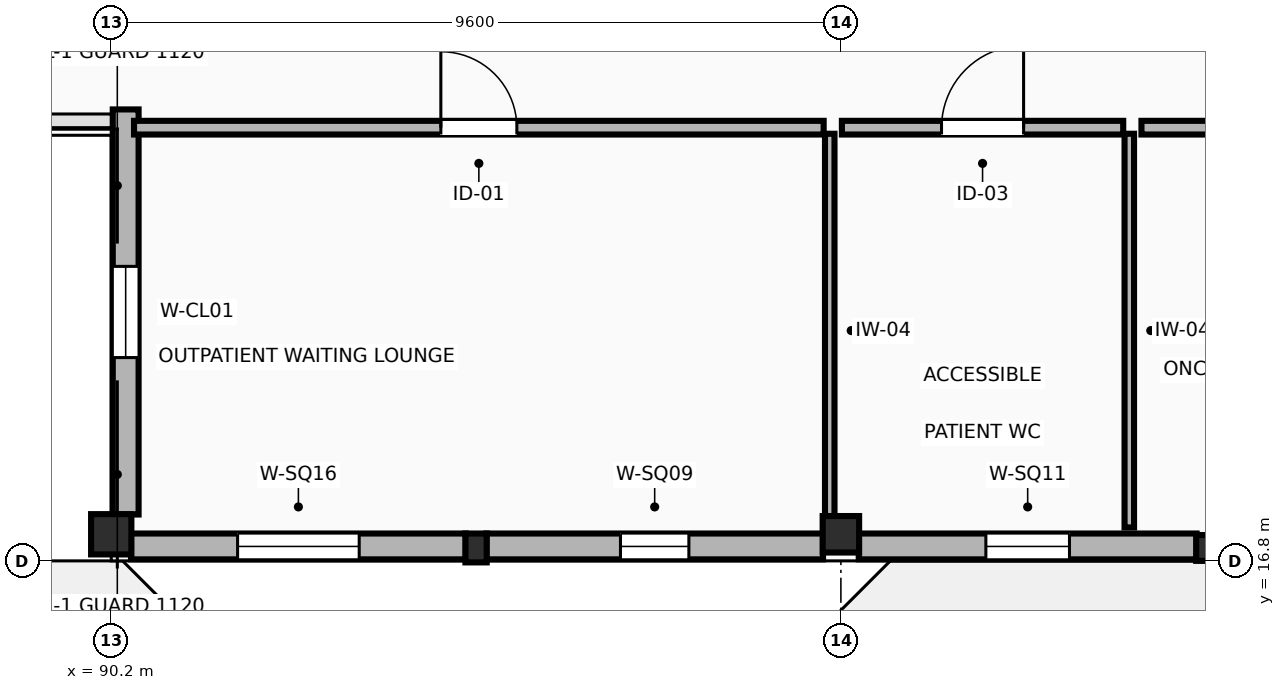
"""IFC4 building model, lengths in metres.
Left out: names, types, materials, properties, quantities, classifications, styles, units other than length and angle.
Written with IfcOpenShell. Run it as: python <this file> out.ifc"""

import sys

from ifc_helpers import new_model, si_unit, direction, frame, frame_2d, origin, origin_2d, place, context, subcontext, project, spatial, rectangle, extrude, element, fill, save


model = new_model("IFC4")
c1 = context("Model", 3, precision=1e-05, world=origin(), true_north=direction((0.0, 1.0)))
c2 = subcontext(c1, "Body", "Model", "MODEL_VIEW")
j1 = project(units=[si_unit("LENGTHUNIT", "METRE"), si_unit("PLANEANGLEUNIT", "RADIAN")], contexts=[c1])
p1 = place(None, origin())
s1 = spatial("IfcSite", under=j1, at=p1, CompositionType="ELEMENT")
p2 = place(p1, origin())
s2 = spatial("IfcBuilding", under=s1, at=p2, CompositionType="ELEMENT")
p3 = place(p2, frame((0.0, 0.0, 5.4)))
s3 = spatial("IfcBuildingStorey", under=s2, at=p3, CompositionType="ELEMENT", Elevation=5.4)
p4 = place(p3, frame((90.2, 17.15, 0.0), z_axis=(0.0, 0.0, 1.0), x_axis=(1.0, 0.0, 0.0)))
e1 = element("IfcColumn", 1, at=p4, inside=s3, PredefinedType="COLUMN", context=c2, shape_type="SweptSolid", body=[
    extrude(rectangle(XDim=0.53, YDim=0.53, at=origin_2d()), origin(), (0.0, 0.0, 1.0), 4.2),
])
p5 = place(p3, frame((99.8, 17.15, 0.0), z_axis=(0.0, 0.0, 1.0), x_axis=(1.0, 0.0, 0.0)))
e2 = element("IfcColumn", 2, at=p5, inside=s3, PredefinedType="COLUMN", context=c2, shape_type="SweptSolid", body=[
    extrude(rectangle(XDim=0.48, YDim=0.48, at=origin_2d()), origin(), (0.0, 0.0, 1.0), 4.2),
])
p6 = place(p3, frame((95.0, 16.97, 0.0), z_axis=(0.0, 0.0, 1.0), x_axis=(1.0, 0.0, 0.0)))
e3 = element("IfcColumn", 3, at=p6, inside=s3, PredefinedType="PILASTER", context=c2, shape_type="SweptSolid", body=[
    extrude(rectangle(XDim=0.28, YDim=0.38, at=origin_2d()), origin(), (0.0, 0.0, 1.0), 4.2),
])
p7 = place(p3, frame((104.6, 16.97, 0.0), z_axis=(0.0, 0.0, 1.0), x_axis=(1.0, 0.0, 0.0)))
e4 = element("IfcColumn", 4, at=p7, inside=s3, PredefinedType="PILASTER", context=c2, shape_type="SweptSolid", body=[
    extrude(rectangle(XDim=0.25, YDim=0.34, at=origin_2d()), origin(), (0.0, 0.0, 1.0), 4.2),
])
p8 = place(p3, frame((90.39, 22.74, 0.0), z_axis=(0.0, 0.0, 1.0), x_axis=(0.0, -1.0, 0.0)))
e5 = element("IfcWall", 5, at=p8, inside=s3, PredefinedType="STANDARD", context=c2, shape_type="SweptSolid", body=[
    extrude(rectangle(XDim=5.33, YDim=0.34, at=frame_2d((2.665, 0.0))), origin(), (0.0, 0.0, 1.0), 3.335),
])
p9 = place(p8, frame((2.065, 0.0, 0.95)))
e6 = element("IfcOpeningElement", 6, at=p9, cuts=e5, PredefinedType="OPENING", context=c2, shape_type="SweptSolid", body=[
    extrude(rectangle(XDim=1.2, YDim=1.5, at=frame_2d((0.6, 0.75))), frame((0.0, 0.18, 0.0), z_axis=(0.0, -1.0, 0.0), x_axis=(1.0, 0.0, 0.0)), (0.0, 0.0, 1.0), 0.36),
])
p10 = place(p3, frame((90.46, 16.99, 0.0), z_axis=(0.0, 0.0, 1.0), x_axis=(1.0, 0.0, 0.0)))
e7 = element("IfcWall", 7, at=p10, inside=s3, PredefinedType="STANDARD", context=c2, shape_type="SweptSolid", body=[
    extrude(rectangle(XDim=4.405, YDim=0.34, at=frame_2d((2.203, 0.0))), origin(), (0.0, 0.0, 1.0), 3.185),
])
p11 = place(p10, frame((1.403, 0.0, 0.95)))
e8 = element("IfcOpeningElement", 8, at=p11, cuts=e7, PredefinedType="OPENING", context=c2, shape_type="SweptSolid", body=[
    extrude(rectangle(XDim=1.6, YDim=1.6, at=frame_2d((0.8, 0.8))), frame((0.0, 0.18, 0.0), z_axis=(0.0, -1.0, 0.0), x_axis=(1.0, 0.0, 0.0)), (0.0, 0.0, 1.0), 0.36),
])
p12 = place(p3, frame((95.135, 16.99, 0.0), z_axis=(0.0, 0.0, 1.0), x_axis=(1.0, 0.0, 0.0)))
e9 = element("IfcWall", 9, at=p12, inside=s3, PredefinedType="STANDARD", context=c2, shape_type="SweptSolid", body=[
    extrude(rectangle(XDim=4.43, YDim=0.34, at=frame_2d((2.215, 0.0))), origin(), (0.0, 0.0, 1.0), 3.185),
])
p13 = place(p12, frame((1.765, 0.0, 0.95)))
e10 = element("IfcOpeningElement", 10, at=p13, cuts=e9, PredefinedType="OPENING", context=c2, shape_type="SweptSolid", body=[
    extrude(rectangle(XDim=0.9, YDim=0.9, at=frame_2d((0.45, 0.45))), frame((0.0, 0.18, 0.0), z_axis=(0.0, -1.0, 0.0), x_axis=(1.0, 0.0, 0.0)), (0.0, 0.0, 1.0), 0.36),
])
p14 = place(p3, frame((100.035, 16.99, 0.0), z_axis=(0.0, 0.0, 1.0), x_axis=(1.0, 0.0, 0.0)))
e11 = element("IfcWall", 11, at=p14, inside=s3, PredefinedType="STANDARD", context=c2, shape_type="SweptSolid", body=[
    extrude(rectangle(XDim=4.445, YDim=0.34, at=frame_2d((2.223, 0.0))), origin(), (0.0, 0.0, 1.0), 3.185),
])
p15 = place(p14, frame((1.673, 0.0, 1.15)))
e12 = element("IfcOpeningElement", 12, at=p15, cuts=e11, PredefinedType="OPENING", context=c2, shape_type="SweptSolid", body=[
    extrude(rectangle(XDim=1.1, YDim=1.1, at=frame_2d((0.55, 0.55))), frame((0.0, 0.18, 0.0), z_axis=(0.0, -1.0, 0.0), x_axis=(1.0, 0.0, 0.0)), (0.0, 0.0, 1.0), 0.36),
])
p16 = place(p3, frame((90.5, 22.5, 0.0), z_axis=(0.0, 0.0, 1.0), x_axis=(1.0, 0.0, 0.0)))
e13 = element("IfcWall", 13, at=p16, inside=s3, PredefinedType="PARTITIONING", context=c2, shape_type="SweptSolid", body=[
    extrude(rectangle(XDim=9.073, YDim=0.18, at=frame_2d((4.537, 0.0))), origin(), (0.0, 0.0, 1.0), 3.92),
])
p17 = place(p16, frame((4.037, 0.0, 0.0)))
e14 = element("IfcOpeningElement", 14, at=p17, cuts=e13, PredefinedType="OPENING", context=c2, shape_type="SweptSolid", body=[
    extrude(rectangle(XDim=1.0, YDim=2.15, at=frame_2d((0.5, 1.075))), frame((0.0, 0.1, 0.0), z_axis=(0.0, -1.0, 0.0), x_axis=(1.0, 0.0, 0.0)), (0.0, 0.0, 1.0), 0.2),
])
p18 = place(p3, frame((99.653, 22.42, 0.0), z_axis=(0.0, 0.0, 1.0), x_axis=(0.0, -1.0, 0.0)))
e15 = element("IfcWall", 15, at=p18, inside=s3, PredefinedType="PARTITIONING", context=c2, shape_type="SweptSolid", body=[
    extrude(rectangle(XDim=5.18, YDim=0.125, at=frame_2d((2.59, 0.0))), origin(), (0.0, 0.0, 1.0), 3.405),
])
p19 = place(p3, frame((103.594, 22.42, 0.0), z_axis=(0.0, 0.0, 1.0), x_axis=(0.0, -1.0, 0.0)))
e16 = element("IfcWall", 16, at=p19, inside=s3, PredefinedType="PARTITIONING", context=c2, shape_type="SweptSolid", body=[
    extrude(rectangle(XDim=5.18, YDim=0.125, at=frame_2d((2.59, 0.0))), origin(), (0.0, 0.0, 1.0), 3.92),
])
p20 = place(p3, frame((99.813, 22.5, 0.0), z_axis=(0.0, 0.0, 1.0), x_axis=(1.0, 0.0, 0.0)))
e17 = element("IfcWall", 17, at=p20, inside=s3, PredefinedType="PARTITIONING", context=c2, shape_type="SweptSolid", body=[
    extrude(rectangle(XDim=3.701, YDim=0.18, at=frame_2d((1.851, 0.0))), origin(), (0.0, 0.0, 1.0), 3.92),
])
p21 = place(p20, frame((1.311, 0.0, 0.0)))
e18 = element("IfcOpeningElement", 18, at=p21, cuts=e17, PredefinedType="OPENING", context=c2, shape_type="SweptSolid", body=[
    extrude(rectangle(XDim=1.08, YDim=2.2, at=frame_2d((0.54, 1.1))), frame((0.0, 0.1, 0.0), z_axis=(0.0, -1.0, 0.0), x_axis=(1.0, 0.0, 0.0)), (0.0, 0.0, 1.0), 0.2),
])
p22 = place(p3, frame((103.754, 22.5, 0.0), z_axis=(0.0, 0.0, 1.0), x_axis=(1.0, 0.0, 0.0)))
e19 = element("IfcWall", 19, at=p22, inside=s3, PredefinedType="PARTITIONING", context=c2, shape_type="SweptSolid", body=[
    extrude(rectangle(XDim=5.092, YDim=0.18, at=frame_2d((2.546, 0.0))), origin(), (0.0, 0.0, 1.0), 3.92),
])
p23 = place(p22, frame((2.066, 0.0, 0.0)))
e20 = element("IfcOpeningElement", 20, at=p23, cuts=e19, PredefinedType="OPENING", context=c2, shape_type="SweptSolid", body=[
    extrude(rectangle(XDim=0.96, YDim=2.1, at=frame_2d((0.48, 1.05))), frame((0.0, 0.1, 0.0), z_axis=(0.0, -1.0, 0.0), x_axis=(1.0, 0.0, 0.0)), (0.0, 0.0, 1.0), 0.2),
])
p24 = place(p9, origin())
e21 = element("IfcWindow", 21, at=p24, inside=s3, PartitioningType="SINGLE_PANEL", PredefinedType="WINDOW", context=c2, shape_type="SweptSolid", body=[
    extrude(rectangle(XDim=1.2, YDim=1.5, at=frame_2d((0.6, 0.75))), frame((0.0, 0.03, 0.0), z_axis=(0.0, -1.0, 0.0), x_axis=(1.0, 0.0, 0.0)), (0.0, 0.0, 1.0), 0.06),
])
fill(e6, e21)
p25 = place(p11, origin())
e22 = element("IfcWindow", 22, at=p25, inside=s3, PartitioningType="SINGLE_PANEL", PredefinedType="WINDOW", context=c2, shape_type="SweptSolid", body=[
    extrude(rectangle(XDim=1.6, YDim=1.6, at=frame_2d((0.8, 0.8))), frame((0.0, 0.03, 0.0), z_axis=(0.0, -1.0, 0.0), x_axis=(1.0, 0.0, 0.0)), (0.0, 0.0, 1.0), 0.06),
])
fill(e8, e22)
p26 = place(p13, origin())
e23 = element("IfcWindow", 23, at=p26, inside=s3, PartitioningType="SINGLE_PANEL", PredefinedType="WINDOW", context=c2, shape_type="SweptSolid", body=[
    extrude(rectangle(XDim=0.9, YDim=0.9, at=frame_2d((0.45, 0.45))), frame((0.0, 0.03, 0.0), z_axis=(0.0, -1.0, 0.0), x_axis=(1.0, 0.0, 0.0)), (0.0, 0.0, 1.0), 0.06),
])
fill(e10, e23)
p27 = place(p15, origin())
e24 = element("IfcWindow", 24, at=p27, inside=s3, PartitioningType="SINGLE_PANEL", PredefinedType="WINDOW", context=c2, shape_type="SweptSolid", body=[
    extrude(rectangle(XDim=1.1, YDim=1.1, at=frame_2d((0.55, 0.55))), frame((0.0, 0.03, 0.0), z_axis=(0.0, -1.0, 0.0), x_axis=(1.0, 0.0, 0.0)), (0.0, 0.0, 1.0), 0.06),
])
fill(e12, e24)
p28 = place(p17, origin())
e25 = element("IfcDoor", 25, at=p28, inside=s3, OperationType="SINGLE_SWING_LEFT", PredefinedType="DOOR", context=c2, shape_type="SweptSolid", body=[
    extrude(rectangle(XDim=1.0, YDim=2.15, at=frame_2d((0.5, 1.075))), frame((0.0, 0.025, 0.0), z_axis=(0.0, -1.0, 0.0), x_axis=(1.0, 0.0, 0.0)), (0.0, 0.0, 1.0), 0.05),
])
fill(e14, e25)
p29 = place(p21, origin())
e26 = element("IfcDoor", 26, at=p29, inside=s3, OperationType="SINGLE_SWING_RIGHT", PredefinedType="DOOR", context=c2, shape_type="SweptSolid", body=[
    extrude(rectangle(XDim=1.08, YDim=2.2, at=frame_2d((0.54, 1.1))), frame((0.0, 0.025, 0.0), z_axis=(0.0, -1.0, 0.0), x_axis=(1.0, 0.0, 0.0)), (0.0, 0.0, 1.0), 0.05),
])
fill(e18, e26)
save(model, sys.argv[1])
